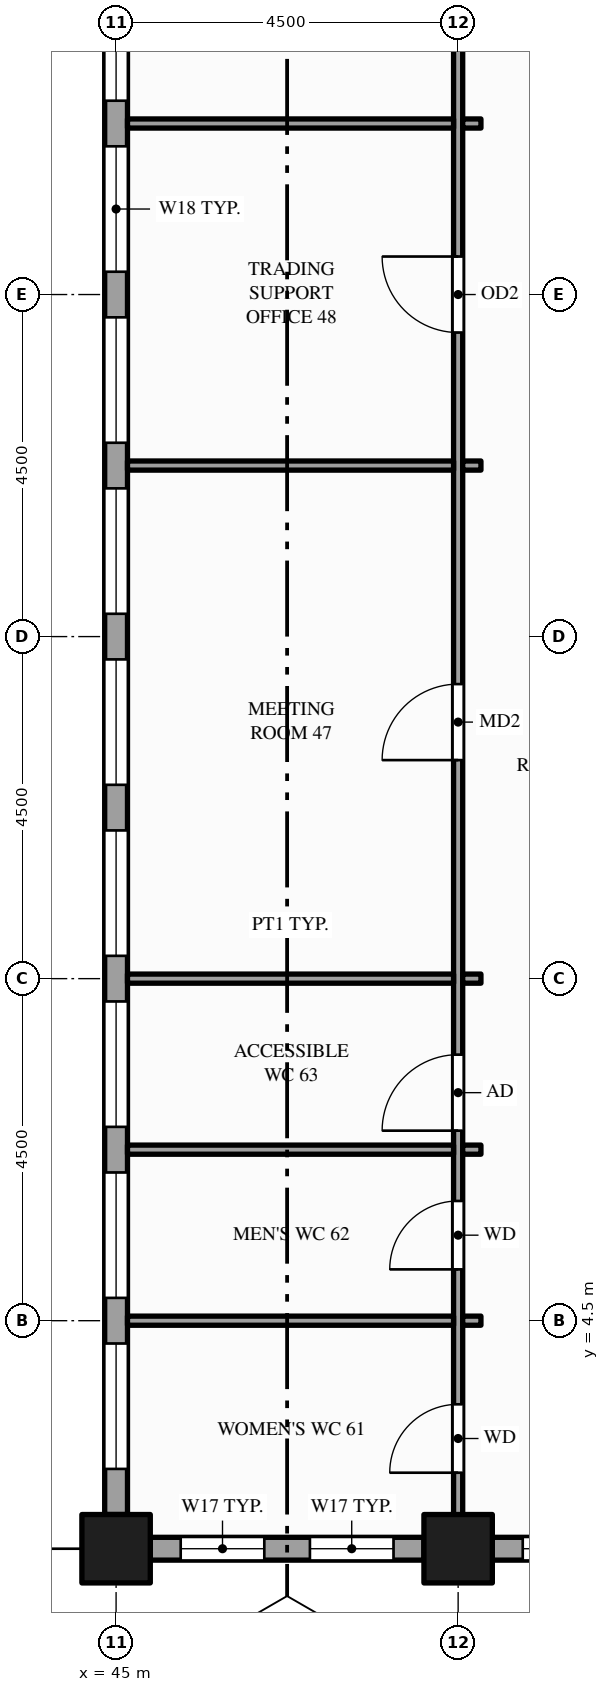
"""IFC4 building model, lengths in metres.
Left out: names, types, materials, properties, quantities, classifications, styles, units other than length and angle.
Written with IfcOpenShell. Run it as: python <this file> out.ifc"""

import sys

from ifc_helpers import new_model, si_unit, direction, frame, frame_2d, origin, origin_2d, place, context, subcontext, project, spatial, rectangle, hollow_rectangle, extrude, element, fill, save


model = new_model("IFC4")
c1 = context("Model", 3, precision=1e-05, world=origin(), true_north=direction((0.0, 1.0)))
c2 = subcontext(c1, "Body", "Model", "MODEL_VIEW")
j1 = project(units=[si_unit("LENGTHUNIT", "METRE"), si_unit("PLANEANGLEUNIT", "RADIAN")], contexts=[c1])
p1 = place(None, origin())
s1 = spatial("IfcSite", under=j1, at=p1, CompositionType="ELEMENT")
p2 = place(p1, origin())
s2 = spatial("IfcBuilding", under=s1, at=p2, CompositionType="ELEMENT")
p3 = place(p2, frame((0.0, 0.0, 147.0)))
s3 = spatial("IfcBuildingStorey", under=s2, at=p3, CompositionType="ELEMENT", Elevation=147.0)
for number, where, z_axis, x_axis in (
    (1, (45.0, 1.5, -0.15), (0.0, 0.0, 1.0), (1.0, 0.0, 0.0)),
    (2, (49.5, 1.5, -0.15), (0.0, 0.0, 1.0), (1.0, 0.0, 0.0)),
):
    element("IfcColumn", number, at=place(p3, frame(where, z_axis=z_axis, x_axis=x_axis)), inside=s3, PredefinedType="COLUMN", context=c2, shape_type="SweptSolid", body=[
        extrude(hollow_rectangle(XDim=0.9, YDim=0.9, WallThickness=0.045, at=origin_2d()), origin(), (0.0, 0.0, 1.0), 4.0),
    ])
p4 = place(p3, frame((45.45, 1.5, 0.0), z_axis=(0.0, 0.0, 1.0), x_axis=(1.0, 0.0, 0.0)))
e3 = element("IfcWall", 3, at=p4, inside=s3, PredefinedType="STANDARD", context=c2, shape_type="SweptSolid", body=[
    extrude(rectangle(XDim=3.6, YDim=0.3, at=frame_2d((1.8, 0.0))), origin(), (0.0, 0.0, 1.0), 2.87),
])
p5 = place(p4, frame((0.4, 0.0, 0.9)))
e4 = element("IfcOpeningElement", 4, at=p5, cuts=e3, PredefinedType="OPENING", context=c2, shape_type="SweptSolid", body=[
    extrude(rectangle(XDim=1.1, YDim=1.75, at=frame_2d((0.55, 0.875))), frame((0.0, 0.16, 0.0), z_axis=(0.0, -1.0, 0.0), x_axis=(1.0, 0.0, 0.0)), (0.0, 0.0, 1.0), 0.32),
])
p6 = place(p4, frame((2.1, 0.0, 0.9)))
e5 = element("IfcOpeningElement", 5, at=p6, cuts=e3, PredefinedType="OPENING", context=c2, shape_type="SweptSolid", body=[
    extrude(rectangle(XDim=1.1, YDim=1.75, at=frame_2d((0.55, 0.875))), frame((0.0, 0.16, 0.0), z_axis=(0.0, -1.0, 0.0), x_axis=(1.0, 0.0, 0.0)), (0.0, 0.0, 1.0), 0.32),
])
p7 = place(p3, frame((49.95, 1.5, 0.0), z_axis=(0.0, 0.0, 1.0), x_axis=(1.0, 0.0, 0.0)))
e6 = element("IfcWall", 6, at=p7, inside=s3, PredefinedType="STANDARD", context=c2, shape_type="SweptSolid", body=[
    extrude(rectangle(XDim=4.05, YDim=0.3, at=frame_2d((2.025, 0.0))), origin(), (0.0, 0.0, 1.0), 2.87),
])
p8 = place(p7, frame((0.4, 0.0, 0.9)))
e7 = element("IfcOpeningElement", 7, at=p8, cuts=e6, PredefinedType="OPENING", context=c2, shape_type="SweptSolid", body=[
    extrude(rectangle(XDim=1.1, YDim=1.75, at=frame_2d((0.55, 0.875))), frame((0.0, 0.16, 0.0), z_axis=(0.0, -1.0, 0.0), x_axis=(1.0, 0.0, 0.0)), (0.0, 0.0, 1.0), 0.32),
])
p9 = place(p7, frame((2.1, 0.0, 0.9)))
e8 = element("IfcOpeningElement", 8, at=p9, cuts=e6, PredefinedType="OPENING", context=c2, shape_type="SweptSolid", body=[
    extrude(rectangle(XDim=1.55, YDim=1.75, at=frame_2d((0.775, 0.875))), frame((0.0, 0.16, 0.0), z_axis=(0.0, -1.0, 0.0), x_axis=(1.0, 0.0, 0.0)), (0.0, 0.0, 1.0), 0.32),
])
p10 = place(p3, frame((45.0, 23.55, 0.0), z_axis=(0.0, 0.0, 1.0), x_axis=(0.0, -1.0, 0.0)))
e9 = element("IfcWall", 9, at=p10, inside=s3, PredefinedType="STANDARD", context=c2, shape_type="SweptSolid", body=[
    extrude(rectangle(XDim=21.6, YDim=0.3, at=frame_2d((10.8, 0.0))), origin(), (0.0, 0.0, 1.0), 2.87),
])
p11 = place(p10, frame((1.35, 0.0, 0.9)))
e10 = element("IfcOpeningElement", 10, at=p11, cuts=e9, PredefinedType="OPENING", context=c2, shape_type="SweptSolid", body=[
    extrude(rectangle(XDim=1.65, YDim=1.75, at=frame_2d((0.825, 0.875))), frame((0.0, 0.16, 0.0), z_axis=(0.0, -1.0, 0.0), x_axis=(1.0, 0.0, 0.0)), (0.0, 0.0, 1.0), 0.32),
])
p12 = place(p10, frame((3.6, 0.0, 0.9)))
e11 = element("IfcOpeningElement", 11, at=p12, cuts=e9, PredefinedType="OPENING", context=c2, shape_type="SweptSolid", body=[
    extrude(rectangle(XDim=1.65, YDim=1.75, at=frame_2d((0.825, 0.875))), frame((0.0, 0.16, 0.0), z_axis=(0.0, -1.0, 0.0), x_axis=(1.0, 0.0, 0.0)), (0.0, 0.0, 1.0), 0.32),
])
p13 = place(p10, frame((5.85, 0.0, 0.9)))
e12 = element("IfcOpeningElement", 12, at=p13, cuts=e9, PredefinedType="OPENING", context=c2, shape_type="SweptSolid", body=[
    extrude(rectangle(XDim=1.65, YDim=1.75, at=frame_2d((0.825, 0.875))), frame((0.0, 0.16, 0.0), z_axis=(0.0, -1.0, 0.0), x_axis=(1.0, 0.0, 0.0)), (0.0, 0.0, 1.0), 0.32),
])
p14 = place(p10, frame((8.1, 0.0, 0.9)))
e13 = element("IfcOpeningElement", 13, at=p14, cuts=e9, PredefinedType="OPENING", context=c2, shape_type="SweptSolid", body=[
    extrude(rectangle(XDim=1.65, YDim=1.75, at=frame_2d((0.825, 0.875))), frame((0.0, 0.16, 0.0), z_axis=(0.0, -1.0, 0.0), x_axis=(1.0, 0.0, 0.0)), (0.0, 0.0, 1.0), 0.32),
])
p15 = place(p10, frame((10.35, 0.0, 0.9)))
e14 = element("IfcOpeningElement", 14, at=p15, cuts=e9, PredefinedType="OPENING", context=c2, shape_type="SweptSolid", body=[
    extrude(rectangle(XDim=1.65, YDim=1.75, at=frame_2d((0.825, 0.875))), frame((0.0, 0.16, 0.0), z_axis=(0.0, -1.0, 0.0), x_axis=(1.0, 0.0, 0.0)), (0.0, 0.0, 1.0), 0.32),
])
p16 = place(p10, frame((12.6, 0.0, 0.9)))
e15 = element("IfcOpeningElement", 15, at=p16, cuts=e9, PredefinedType="OPENING", context=c2, shape_type="SweptSolid", body=[
    extrude(rectangle(XDim=1.65, YDim=1.75, at=frame_2d((0.825, 0.875))), frame((0.0, 0.16, 0.0), z_axis=(0.0, -1.0, 0.0), x_axis=(1.0, 0.0, 0.0)), (0.0, 0.0, 1.0), 0.32),
])
p17 = place(p10, frame((14.85, 0.0, 0.9)))
e16 = element("IfcOpeningElement", 16, at=p17, cuts=e9, PredefinedType="OPENING", context=c2, shape_type="SweptSolid", body=[
    extrude(rectangle(XDim=1.65, YDim=1.75, at=frame_2d((0.825, 0.875))), frame((0.0, 0.16, 0.0), z_axis=(0.0, -1.0, 0.0), x_axis=(1.0, 0.0, 0.0)), (0.0, 0.0, 1.0), 0.32),
])
p18 = place(p10, frame((17.1, 0.0, 0.9)))
e17 = element("IfcOpeningElement", 17, at=p18, cuts=e9, PredefinedType="OPENING", context=c2, shape_type="SweptSolid", body=[
    extrude(rectangle(XDim=1.65, YDim=1.75, at=frame_2d((0.825, 0.875))), frame((0.0, 0.16, 0.0), z_axis=(0.0, -1.0, 0.0), x_axis=(1.0, 0.0, 0.0)), (0.0, 0.0, 1.0), 0.32),
])
p19 = place(p10, frame((19.35, 0.0, 0.9)))
e18 = element("IfcOpeningElement", 18, at=p19, cuts=e9, PredefinedType="OPENING", context=c2, shape_type="SweptSolid", body=[
    extrude(rectangle(XDim=1.65, YDim=1.75, at=frame_2d((0.825, 0.875))), frame((0.0, 0.16, 0.0), z_axis=(0.0, -1.0, 0.0), x_axis=(1.0, 0.0, 0.0)), (0.0, 0.0, 1.0), 0.32),
])
p20 = place(p3, frame((49.5, 1.65, 0.0), z_axis=(0.0, 0.0, 1.0), x_axis=(0.0, 1.0, 0.0)))
e19 = element("IfcWall", 19, at=p20, inside=s3, PredefinedType="PARTITIONING", context=c2, shape_type="SweptSolid", body=[
    extrude(rectangle(XDim=22.2, YDim=0.12, at=frame_2d((11.1, 0.0))), origin(), (0.0, 0.0, 1.0), 2.87),
])
p21 = place(p20, frame((0.85, 0.0, 0.0)))
e20 = element("IfcOpeningElement", 20, at=p21, cuts=e19, PredefinedType="OPENING", context=c2, shape_type="SweptSolid", body=[
    extrude(rectangle(XDim=0.9, YDim=2.1, at=frame_2d((0.45, 1.05))), frame((0.0, 0.07, 0.0), z_axis=(0.0, -1.0, 0.0), x_axis=(1.0, 0.0, 0.0)), (0.0, 0.0, 1.0), 0.14),
])
p22 = place(p20, frame((3.525, 0.0, 0.0)))
e21 = element("IfcOpeningElement", 21, at=p22, cuts=e19, PredefinedType="OPENING", context=c2, shape_type="SweptSolid", body=[
    extrude(rectangle(XDim=0.9, YDim=2.1, at=frame_2d((0.45, 1.05))), frame((0.0, 0.07, 0.0), z_axis=(0.0, -1.0, 0.0), x_axis=(1.0, 0.0, 0.0)), (0.0, 0.0, 1.0), 0.14),
])
p23 = place(p20, frame((5.35, 0.0, 0.0)))
e22 = element("IfcOpeningElement", 22, at=p23, cuts=e19, PredefinedType="OPENING", context=c2, shape_type="SweptSolid", body=[
    extrude(rectangle(XDim=1.0, YDim=2.1, at=frame_2d((0.5, 1.05))), frame((0.0, 0.07, 0.0), z_axis=(0.0, -1.0, 0.0), x_axis=(1.0, 0.0, 0.0)), (0.0, 0.0, 1.0), 0.14),
])
p24 = place(p20, frame((10.225, 0.0, 0.0)))
e23 = element("IfcOpeningElement", 23, at=p24, cuts=e19, PredefinedType="OPENING", context=c2, shape_type="SweptSolid", body=[
    extrude(rectangle(XDim=1.0, YDim=2.1, at=frame_2d((0.5, 1.05))), frame((0.0, 0.07, 0.0), z_axis=(0.0, -1.0, 0.0), x_axis=(1.0, 0.0, 0.0)), (0.0, 0.0, 1.0), 0.14),
])
p25 = place(p20, frame((15.85, 0.0, 0.0)))
e24 = element("IfcOpeningElement", 24, at=p25, cuts=e19, PredefinedType="OPENING", context=c2, shape_type="SweptSolid", body=[
    extrude(rectangle(XDim=1.0, YDim=2.1, at=frame_2d((0.5, 1.05))), frame((0.0, 0.07, 0.0), z_axis=(0.0, -1.0, 0.0), x_axis=(1.0, 0.0, 0.0)), (0.0, 0.0, 1.0), 0.14),
])
p26 = place(p20, frame((19.92, 0.0, 0.0)))
e25 = element("IfcOpeningElement", 25, at=p26, cuts=e19, PredefinedType="OPENING", context=c2, shape_type="SweptSolid", body=[
    extrude(rectangle(XDim=1.0, YDim=2.1, at=frame_2d((0.5, 1.05))), frame((0.0, 0.07, 0.0), z_axis=(0.0, -1.0, 0.0), x_axis=(1.0, 0.0, 0.0)), (0.0, 0.0, 1.0), 0.14),
])
p27 = place(p3, frame((45.15, 4.5, 0.0), z_axis=(0.0, 0.0, 1.0), x_axis=(1.0, 0.0, 0.0)))
e26 = element("IfcWall", 26, at=p27, inside=s3, PredefinedType="PARTITIONING", context=c2, shape_type="SweptSolid", body=[
    extrude(rectangle(XDim=4.29, YDim=0.12, at=frame_2d((2.145, 0.0))), origin(), (0.0, 0.0, 1.0), 2.87),
])
p28 = place(p3, frame((49.56, 4.5, 0.0), z_axis=(0.0, 0.0, 1.0), x_axis=(1.0, 0.0, 0.0)))
e27 = element("IfcWall", 27, at=p28, inside=s3, PredefinedType="PARTITIONING", context=c2, shape_type="SweptSolid", body=[
    extrude(rectangle(XDim=0.24, YDim=0.12, at=frame_2d((0.12, 0.0))), origin(), (0.0, 0.0, 1.0), 2.87),
])
p29 = place(p3, frame((45.15, 6.75, 0.0), z_axis=(0.0, 0.0, 1.0), x_axis=(1.0, 0.0, 0.0)))
e28 = element("IfcWall", 28, at=p29, inside=s3, PredefinedType="PARTITIONING", context=c2, shape_type="SweptSolid", body=[
    extrude(rectangle(XDim=4.29, YDim=0.12, at=frame_2d((2.145, 0.0))), origin(), (0.0, 0.0, 1.0), 2.87),
])
p30 = place(p3, frame((49.56, 6.75, 0.0), z_axis=(0.0, 0.0, 1.0), x_axis=(1.0, 0.0, 0.0)))
e29 = element("IfcWall", 29, at=p30, inside=s3, PredefinedType="PARTITIONING", context=c2, shape_type="SweptSolid", body=[
    extrude(rectangle(XDim=0.24, YDim=0.12, at=frame_2d((0.12, 0.0))), origin(), (0.0, 0.0, 1.0), 2.87),
])
p31 = place(p3, frame((45.15, 9.0, 0.0), z_axis=(0.0, 0.0, 1.0), x_axis=(1.0, 0.0, 0.0)))
e30 = element("IfcWall", 30, at=p31, inside=s3, PredefinedType="PARTITIONING", context=c2, shape_type="SweptSolid", body=[
    extrude(rectangle(XDim=4.29, YDim=0.12, at=frame_2d((2.145, 0.0))), origin(), (0.0, 0.0, 1.0), 2.87),
])
p32 = place(p3, frame((49.56, 9.0, 0.0), z_axis=(0.0, 0.0, 1.0), x_axis=(1.0, 0.0, 0.0)))
e31 = element("IfcWall", 31, at=p32, inside=s3, PredefinedType="PARTITIONING", context=c2, shape_type="SweptSolid", body=[
    extrude(rectangle(XDim=0.24, YDim=0.12, at=frame_2d((0.12, 0.0))), origin(), (0.0, 0.0, 1.0), 2.87),
])
p33 = place(p3, frame((45.15, 15.75, 0.0), z_axis=(0.0, 0.0, 1.0), x_axis=(1.0, 0.0, 0.0)))
e32 = element("IfcWall", 32, at=p33, inside=s3, PredefinedType="PARTITIONING", context=c2, shape_type="SweptSolid", body=[
    extrude(rectangle(XDim=4.29, YDim=0.12, at=frame_2d((2.145, 0.0))), origin(), (0.0, 0.0, 1.0), 2.87),
])
p34 = place(p3, frame((49.56, 15.75, 0.0), z_axis=(0.0, 0.0, 1.0), x_axis=(1.0, 0.0, 0.0)))
e33 = element("IfcWall", 33, at=p34, inside=s3, PredefinedType="PARTITIONING", context=c2, shape_type="SweptSolid", body=[
    extrude(rectangle(XDim=0.24, YDim=0.12, at=frame_2d((0.12, 0.0))), origin(), (0.0, 0.0, 1.0), 2.87),
])
p35 = place(p3, frame((45.15, 20.25, 0.0), z_axis=(0.0, 0.0, 1.0), x_axis=(1.0, 0.0, 0.0)))
e34 = element("IfcWall", 34, at=p35, inside=s3, PredefinedType="PARTITIONING", context=c2, shape_type="SweptSolid", body=[
    extrude(rectangle(XDim=4.29, YDim=0.12, at=frame_2d((2.145, 0.0))), origin(), (0.0, 0.0, 1.0), 2.87),
])
p36 = place(p3, frame((49.56, 20.25, 0.0), z_axis=(0.0, 0.0, 1.0), x_axis=(1.0, 0.0, 0.0)))
e35 = element("IfcWall", 35, at=p36, inside=s3, PredefinedType="PARTITIONING", context=c2, shape_type="SweptSolid", body=[
    extrude(rectangle(XDim=0.24, YDim=0.12, at=frame_2d((0.12, 0.0))), origin(), (0.0, 0.0, 1.0), 2.87),
])
p37 = place(p5, origin())
e36 = element("IfcWindow", 36, at=p37, inside=s3, PartitioningType="SINGLE_PANEL", PredefinedType="WINDOW", context=c2, shape_type="SweptSolid", body=[
    extrude(rectangle(XDim=1.1, YDim=1.75, at=frame_2d((0.55, 0.875))), frame((0.0, 0.03, 0.0), z_axis=(0.0, -1.0, 0.0), x_axis=(1.0, 0.0, 0.0)), (0.0, 0.0, 1.0), 0.06),
])
fill(e4, e36)
p38 = place(p6, origin())
e37 = element("IfcWindow", 37, at=p38, inside=s3, PartitioningType="SINGLE_PANEL", PredefinedType="WINDOW", context=c2, shape_type="SweptSolid", body=[
    extrude(rectangle(XDim=1.1, YDim=1.75, at=frame_2d((0.55, 0.875))), frame((0.0, 0.03, 0.0), z_axis=(0.0, -1.0, 0.0), x_axis=(1.0, 0.0, 0.0)), (0.0, 0.0, 1.0), 0.06),
])
fill(e5, e37)
p39 = place(p8, origin())
e38 = element("IfcWindow", 38, at=p39, inside=s3, PartitioningType="SINGLE_PANEL", PredefinedType="WINDOW", context=c2, shape_type="SweptSolid", body=[
    extrude(rectangle(XDim=1.1, YDim=1.75, at=frame_2d((0.55, 0.875))), frame((0.0, 0.03, 0.0), z_axis=(0.0, -1.0, 0.0), x_axis=(1.0, 0.0, 0.0)), (0.0, 0.0, 1.0), 0.06),
])
fill(e7, e38)
p40 = place(p11, origin())
e39 = element("IfcWindow", 39, at=p40, inside=s3, PartitioningType="SINGLE_PANEL", PredefinedType="WINDOW", context=c2, shape_type="SweptSolid", body=[
    extrude(rectangle(XDim=1.65, YDim=1.75, at=frame_2d((0.825, 0.875))), frame((0.0, 0.03, 0.0), z_axis=(0.0, -1.0, 0.0), x_axis=(1.0, 0.0, 0.0)), (0.0, 0.0, 1.0), 0.06),
])
fill(e10, e39)
p41 = place(p12, origin())
e40 = element("IfcWindow", 40, at=p41, inside=s3, PartitioningType="SINGLE_PANEL", PredefinedType="WINDOW", context=c2, shape_type="SweptSolid", body=[
    extrude(rectangle(XDim=1.65, YDim=1.75, at=frame_2d((0.825, 0.875))), frame((0.0, 0.03, 0.0), z_axis=(0.0, -1.0, 0.0), x_axis=(1.0, 0.0, 0.0)), (0.0, 0.0, 1.0), 0.06),
])
fill(e11, e40)
p42 = place(p13, origin())
e41 = element("IfcWindow", 41, at=p42, inside=s3, PartitioningType="SINGLE_PANEL", PredefinedType="WINDOW", context=c2, shape_type="SweptSolid", body=[
    extrude(rectangle(XDim=1.65, YDim=1.75, at=frame_2d((0.825, 0.875))), frame((0.0, 0.03, 0.0), z_axis=(0.0, -1.0, 0.0), x_axis=(1.0, 0.0, 0.0)), (0.0, 0.0, 1.0), 0.06),
])
fill(e12, e41)
p43 = place(p14, origin())
e42 = element("IfcWindow", 42, at=p43, inside=s3, PartitioningType="SINGLE_PANEL", PredefinedType="WINDOW", context=c2, shape_type="SweptSolid", body=[
    extrude(rectangle(XDim=1.65, YDim=1.75, at=frame_2d((0.825, 0.875))), frame((0.0, 0.03, 0.0), z_axis=(0.0, -1.0, 0.0), x_axis=(1.0, 0.0, 0.0)), (0.0, 0.0, 1.0), 0.06),
])
fill(e13, e42)
p44 = place(p15, origin())
e43 = element("IfcWindow", 43, at=p44, inside=s3, PartitioningType="SINGLE_PANEL", PredefinedType="WINDOW", context=c2, shape_type="SweptSolid", body=[
    extrude(rectangle(XDim=1.65, YDim=1.75, at=frame_2d((0.825, 0.875))), frame((0.0, 0.03, 0.0), z_axis=(0.0, -1.0, 0.0), x_axis=(1.0, 0.0, 0.0)), (0.0, 0.0, 1.0), 0.06),
])
fill(e14, e43)
p45 = place(p16, origin())
e44 = element("IfcWindow", 44, at=p45, inside=s3, PartitioningType="SINGLE_PANEL", PredefinedType="WINDOW", context=c2, shape_type="SweptSolid", body=[
    extrude(rectangle(XDim=1.65, YDim=1.75, at=frame_2d((0.825, 0.875))), frame((0.0, 0.03, 0.0), z_axis=(0.0, -1.0, 0.0), x_axis=(1.0, 0.0, 0.0)), (0.0, 0.0, 1.0), 0.06),
])
fill(e15, e44)
p46 = place(p17, origin())
e45 = element("IfcWindow", 45, at=p46, inside=s3, PartitioningType="SINGLE_PANEL", PredefinedType="WINDOW", context=c2, shape_type="SweptSolid", body=[
    extrude(rectangle(XDim=1.65, YDim=1.75, at=frame_2d((0.825, 0.875))), frame((0.0, 0.03, 0.0), z_axis=(0.0, -1.0, 0.0), x_axis=(1.0, 0.0, 0.0)), (0.0, 0.0, 1.0), 0.06),
])
fill(e16, e45)
p47 = place(p18, origin())
e46 = element("IfcWindow", 46, at=p47, inside=s3, PartitioningType="SINGLE_PANEL", PredefinedType="WINDOW", context=c2, shape_type="SweptSolid", body=[
    extrude(rectangle(XDim=1.65, YDim=1.75, at=frame_2d((0.825, 0.875))), frame((0.0, 0.03, 0.0), z_axis=(0.0, -1.0, 0.0), x_axis=(1.0, 0.0, 0.0)), (0.0, 0.0, 1.0), 0.06),
])
fill(e17, e46)
p48 = place(p19, origin())
e47 = element("IfcWindow", 47, at=p48, inside=s3, PartitioningType="SINGLE_PANEL", PredefinedType="WINDOW", context=c2, shape_type="SweptSolid", body=[
    extrude(rectangle(XDim=1.65, YDim=1.75, at=frame_2d((0.825, 0.875))), frame((0.0, 0.03, 0.0), z_axis=(0.0, -1.0, 0.0), x_axis=(1.0, 0.0, 0.0)), (0.0, 0.0, 1.0), 0.06),
])
fill(e18, e47)
p49 = place(p21, origin())
e48 = element("IfcDoor", 48, at=p49, inside=s3, OperationType="SINGLE_SWING_LEFT", PredefinedType="DOOR", context=c2, shape_type="SweptSolid", body=[
    extrude(rectangle(XDim=0.9, YDim=2.1, at=frame_2d((0.45, 1.05))), frame((0.0, 0.025, 0.0), z_axis=(0.0, -1.0, 0.0), x_axis=(1.0, 0.0, 0.0)), (0.0, 0.0, 1.0), 0.05),
])
fill(e20, e48)
p50 = place(p22, origin())
e49 = element("IfcDoor", 49, at=p50, inside=s3, OperationType="SINGLE_SWING_LEFT", PredefinedType="DOOR", context=c2, shape_type="SweptSolid", body=[
    extrude(rectangle(XDim=0.9, YDim=2.1, at=frame_2d((0.45, 1.05))), frame((0.0, 0.025, 0.0), z_axis=(0.0, -1.0, 0.0), x_axis=(1.0, 0.0, 0.0)), (0.0, 0.0, 1.0), 0.05),
])
fill(e21, e49)
p51 = place(p23, origin())
e50 = element("IfcDoor", 50, at=p51, inside=s3, OperationType="SINGLE_SWING_LEFT", PredefinedType="DOOR", context=c2, shape_type="SweptSolid", body=[
    extrude(rectangle(XDim=1.0, YDim=2.1, at=frame_2d((0.5, 1.05))), frame((0.0, 0.025, 0.0), z_axis=(0.0, -1.0, 0.0), x_axis=(1.0, 0.0, 0.0)), (0.0, 0.0, 1.0), 0.05),
])
fill(e22, e50)
p52 = place(p24, origin())
e51 = element("IfcDoor", 51, at=p52, inside=s3, OperationType="SINGLE_SWING_LEFT", PredefinedType="DOOR", context=c2, shape_type="SweptSolid", body=[
    extrude(rectangle(XDim=1.0, YDim=2.1, at=frame_2d((0.5, 1.05))), frame((0.0, 0.025, 0.0), z_axis=(0.0, -1.0, 0.0), x_axis=(1.0, 0.0, 0.0)), (0.0, 0.0, 1.0), 0.05),
])
fill(e23, e51)
p53 = place(p25, origin())
e52 = element("IfcDoor", 52, at=p53, inside=s3, OperationType="SINGLE_SWING_RIGHT", PredefinedType="DOOR", context=c2, shape_type="SweptSolid", body=[
    extrude(rectangle(XDim=1.0, YDim=2.1, at=frame_2d((0.5, 1.05))), frame((0.0, 0.025, 0.0), z_axis=(0.0, -1.0, 0.0), x_axis=(1.0, 0.0, 0.0)), (0.0, 0.0, 1.0), 0.05),
])
fill(e24, e52)
save(model, sys.argv[1])
